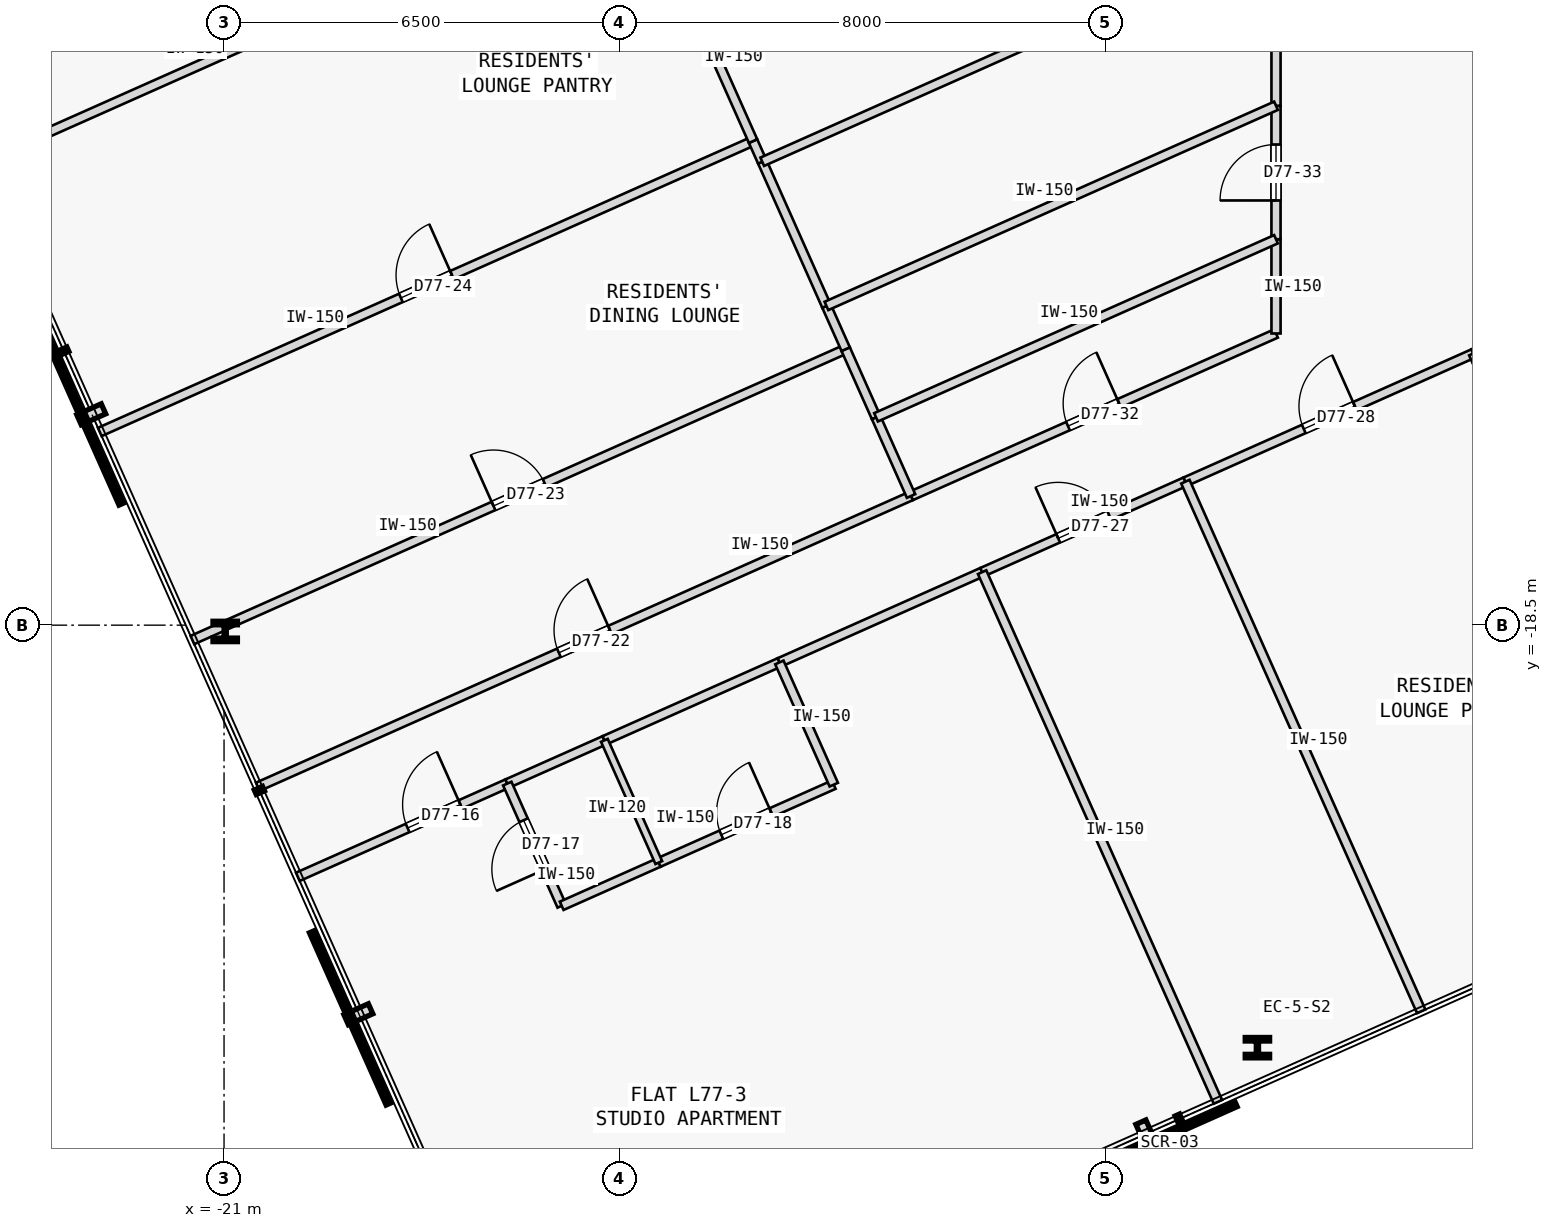
"""IFC4 building model, lengths in metres.
Left out: names, types, materials, properties, quantities, classifications, styles, units other than length and angle.
Written with IfcOpenShell. Run it as: python <this file> out.ifc"""

import sys

from ifc_helpers import new_model, si_unit, direction, frame, frame_2d, origin, origin_2d, place, context, subcontext, project, spatial, rectangle, i_section, extrude, element, fill, save


model = new_model("IFC4")
c1 = context("Model", 3, precision=1e-05, world=origin(), true_north=direction((0.0, 1.0)))
c2 = subcontext(c1, "Body", "Model", "MODEL_VIEW")
j1 = project(units=[si_unit("LENGTHUNIT", "METRE"), si_unit("PLANEANGLEUNIT", "RADIAN")], contexts=[c1])
p1 = place(None, origin())
s1 = spatial("IfcSite", under=j1, at=p1, CompositionType="ELEMENT")
p2 = place(p1, origin())
s2 = spatial("IfcBuilding", under=s1, at=p2, CompositionType="ELEMENT")
p3 = place(p2, frame((0.0, 0.0, 288.6)))
s3 = spatial("IfcBuildingStorey", under=s2, at=p3, CompositionType="ELEMENT", Elevation=288.6)
for number, where, z_axis, x_axis in (
    (1, (-4.006, -25.448, 0.0), (0.0, 0.0, 1.0), (1.0, 0.0, 0.0)),
    (2, (-20.981, -18.603, 0.0), (0.0, 0.0, 1.0), (1.0, 0.0, 0.0)),
):
    element("IfcColumn", number, at=place(p3, frame(where, z_axis=z_axis, x_axis=x_axis)), inside=s3, PredefinedType="COLUMN", context=c2, shape_type="SweptSolid", body=[
        extrude(i_section(OverallWidth=0.401, OverallDepth=0.335, WebThickness=0.036, FlangeThickness=0.058, FilletRadius=0.015, at=origin_2d()), origin(), (0.0, 0.0, 1.0), 3.35),
    ])
p4 = place(p3, frame((-19.786, -22.639, 0.0), z_axis=(0.0, 0.0, 1.0), x_axis=(0.913541633228, 0.406745232743, 0.0)))
e3 = element("IfcWall", 3, at=p4, inside=s3, PredefinedType="PARTITIONING", context=c2, shape_type="SweptSolid", body=[
    extrude(rectangle(XDim=3.77, YDim=0.15, at=frame_2d((1.885, 0.0))), origin(), (0.0, 0.0, 1.0), 3.125),
])
p5 = place(p4, frame((1.976, 0.0, 0.0)))
e4 = element("IfcOpeningElement", 4, at=p5, cuts=e3, PredefinedType="OPENING", context=c2, shape_type="SweptSolid", body=[
    extrude(rectangle(XDim=0.95, YDim=2.15, at=frame_2d((0.475, 1.075))), frame((0.0, 0.085, 0.0), z_axis=(0.0, -1.0, 0.0), x_axis=(1.0, 0.0, 0.0)), (0.0, 0.0, 1.0), 0.17),
])
p6 = place(p3, frame((-11.868, -19.113, 0.0), z_axis=(0.0, 0.0, 1.0), x_axis=(0.913543802, 0.40674036169, 0.0)))
e5 = element("IfcWall", 5, at=p6, inside=s3, PredefinedType="PARTITIONING", context=c2, shape_type="SweptSolid", body=[
    extrude(rectangle(XDim=3.65, YDim=0.15, at=frame_2d((1.825, 0.0))), origin(), (0.0, 0.0, 1.0), 3.125),
])
p7 = place(p3, frame((-16.342, -21.105, 0.0), z_axis=(0.0, 0.0, 1.0), x_axis=(0.9135579554, 0.406708571492, 0.0)))
e6 = element("IfcWall", 6, at=p7, inside=s3, PredefinedType="PARTITIONING", context=c2, shape_type="SweptSolid", body=[
    extrude(rectangle(XDim=1.748, YDim=0.15, at=frame_2d((0.874, 0.0))), origin(), (0.0, 0.0, 1.0), 3.125),
])
p8 = place(p3, frame((-14.745, -20.394, 0.0), z_axis=(0.0, 0.0, 1.0), x_axis=(0.913542880558, 0.406742431252, 0.0)))
e7 = element("IfcWall", 7, at=p8, inside=s3, PredefinedType="PARTITIONING", context=c2, shape_type="SweptSolid", body=[
    extrude(rectangle(XDim=3.15, YDim=0.15, at=frame_2d((1.575, 0.0))), origin(), (0.0, 0.0, 1.0), 3.125),
])
p9 = place(p3, frame((-20.445, -21.159, 0.0), z_axis=(0.0, 0.0, 1.0), x_axis=(0.913547681516, 0.406731648137, 0.0)))
e8 = element("IfcWall", 8, at=p9, inside=s3, PredefinedType="PARTITIONING", context=c2, shape_type="SweptSolid", body=[
    extrude(rectangle(XDim=11.76, YDim=0.15, at=frame_2d((5.88, 0.0))), origin(), (0.0, 0.0, 1.0), 3.125),
])
p10 = place(p9, frame((5.42, 0.0, 0.0)))
e9 = element("IfcOpeningElement", 9, at=p10, cuts=e8, PredefinedType="OPENING", context=c2, shape_type="SweptSolid", body=[
    extrude(rectangle(XDim=0.92, YDim=2.15, at=frame_2d((0.46, 1.075))), frame((0.0, 0.085, 0.0), z_axis=(0.0, -1.0, 0.0), x_axis=(1.0, 0.0, 0.0)), (0.0, 0.0, 1.0), 0.17),
])
p11 = place(p3, frame((-8.533, -17.628, 0.0), z_axis=(0.0, 0.0, 1.0), x_axis=(0.913560976273, 0.406701785873, 0.0)))
e10 = element("IfcWall", 10, at=p11, inside=s3, PredefinedType="PARTITIONING", context=c2, shape_type="SweptSolid", body=[
    extrude(rectangle(XDim=3.659, YDim=0.15, at=frame_2d((1.829, 0.0))), origin(), (0.0, 0.0, 1.0), 3.125),
])
p12 = place(p11, frame((1.369, 0.0, 0.0)))
e11 = element("IfcOpeningElement", 11, at=p12, cuts=e10, PredefinedType="OPENING", context=c2, shape_type="SweptSolid", body=[
    extrude(rectangle(XDim=0.92, YDim=2.15, at=frame_2d((0.46, 1.075))), frame((0.0, 0.085, 0.0), z_axis=(0.0, -1.0, 0.0), x_axis=(1.0, 0.0, 0.0)), (0.0, 0.0, 1.0), 0.17),
])
p13 = place(p3, frame((-5.191, -16.14, 0.0), z_axis=(0.0, 0.0, 1.0), x_axis=(0.913541346619, 0.40674587646, 0.0)))
e12 = element("IfcWall", 12, at=p13, inside=s3, PredefinedType="PARTITIONING", context=c2, shape_type="SweptSolid", body=[
    extrude(rectangle(XDim=5.183, YDim=0.15, at=frame_2d((2.591, 0.0))), origin(), (0.0, 0.0, 1.0), 3.125),
])
p14 = place(p13, frame((2.132, 0.0, 0.0)))
e13 = element("IfcOpeningElement", 13, at=p14, cuts=e12, PredefinedType="OPENING", context=c2, shape_type="SweptSolid", body=[
    extrude(rectangle(XDim=0.92, YDim=2.15, at=frame_2d((0.46, 1.075))), frame((0.0, 0.085, 0.0), z_axis=(0.0, -1.0, 0.0), x_axis=(1.0, 0.0, 0.0)), (0.0, 0.0, 1.0), 0.17),
])
p15 = place(p3, frame((-0.456, -14.032, 0.0), z_axis=(0.0, 0.0, 1.0), x_axis=(0.913541200883, 0.40674620378, 0.0)))
e14 = element("IfcWall", 14, at=p15, inside=s3, PredefinedType="PARTITIONING", context=c2, shape_type="SweptSolid", body=[
    extrude(rectangle(XDim=6.708, YDim=0.15, at=frame_2d((3.354, 0.0))), origin(), (0.0, 0.0, 1.0), 3.125),
])
p16 = place(p15, frame((2.894, 0.0, 0.0)))
e15 = element("IfcOpeningElement", 15, at=p16, cuts=e14, PredefinedType="OPENING", context=c2, shape_type="SweptSolid", body=[
    extrude(rectangle(XDim=0.92, YDim=2.15, at=frame_2d((0.46, 1.075))), frame((0.0, 0.085, 0.0), z_axis=(0.0, -1.0, 0.0), x_axis=(1.0, 0.0, 0.0)), (0.0, 0.0, 1.0), 0.17),
])
p17 = place(p3, frame((-9.702, -16.375, 0.0), z_axis=(0.0, 0.0, 1.0), x_axis=(0.913552389019, 0.406721074594, 0.0)))
e16 = element("IfcWall", 16, at=p17, inside=s3, PredefinedType="PARTITIONING", context=c2, shape_type="SweptSolid", body=[
    extrude(rectangle(XDim=6.57, YDim=0.15, at=frame_2d((3.285, 0.0))), origin(), (0.0, 0.0, 1.0), 3.125),
])
p18 = place(p17, frame((2.825, 0.0, 0.0)))
e17 = element("IfcOpeningElement", 17, at=p18, cuts=e16, PredefinedType="OPENING", context=c2, shape_type="SweptSolid", body=[
    extrude(rectangle(XDim=0.92, YDim=2.15, at=frame_2d((0.46, 1.075))), frame((0.0, 0.085, 0.0), z_axis=(0.0, -1.0, 0.0), x_axis=(1.0, 0.0, 0.0)), (0.0, 0.0, 1.0), 0.17),
])
p19 = place(p3, frame((-3.7, -13.703, 0.0), z_axis=(0.0, 0.0, 1.0), x_axis=(-0.000157529929, 0.999999987592, 0.0)))
e18 = element("IfcWall", 18, at=p19, inside=s3, PredefinedType="PARTITIONING", context=c2, shape_type="SweptSolid", body=[
    extrude(rectangle(XDim=1.55, YDim=0.15, at=frame_2d((0.775, 0.0))), origin(), (0.0, 0.0, 1.0), 3.125),
])
p20 = place(p3, frame((-3.7, -12.154, 0.0), z_axis=(0.0, 0.0, 1.0), x_axis=(0.000111222333, 0.999999993815, 0.0)))
e19 = element("IfcWall", 19, at=p20, inside=s3, PredefinedType="PARTITIONING", context=c2, shape_type="SweptSolid", body=[
    extrude(rectangle(XDim=2.195, YDim=0.15, at=frame_2d((1.098, 0.0))), origin(), (0.0, 0.0, 1.0), 3.125),
])
p21 = place(p20, frame((0.637, 0.0, 0.0)))
e20 = element("IfcOpeningElement", 20, at=p21, cuts=e19, PredefinedType="OPENING", context=c2, shape_type="SweptSolid", body=[
    extrude(rectangle(XDim=0.92, YDim=2.15, at=frame_2d((0.46, 1.075))), frame((0.0, 0.085, 0.0), z_axis=(0.0, -1.0, 0.0), x_axis=(1.0, 0.0, 0.0)), (0.0, 0.0, 1.0), 0.17),
])
p22 = place(p3, frame((-3.7, -9.958, 0.0), z_axis=(0.0, 0.0, 1.0), x_axis=(-0.000171909917, 0.999999985223, 0.0)))
e21 = element("IfcWall", 21, at=p22, inside=s3, PredefinedType="PARTITIONING", context=c2, shape_type="SweptSolid", body=[
    extrude(rectangle(XDim=2.84, YDim=0.15, at=frame_2d((1.42, 0.0))), origin(), (0.0, 0.0, 1.0), 3.125),
])
p23 = place(p22, frame((0.96, 0.0, 0.0)))
e22 = element("IfcOpeningElement", 22, at=p23, cuts=e21, PredefinedType="OPENING", context=c2, shape_type="SweptSolid", body=[
    extrude(rectangle(XDim=0.92, YDim=2.15, at=frame_2d((0.46, 1.075))), frame((0.0, 0.085, 0.0), z_axis=(0.0, -1.0, 0.0), x_axis=(1.0, 0.0, 0.0)), (0.0, 0.0, 1.0), 0.17),
])
p24 = place(p3, frame((-15.448, -23.115, 0.0), z_axis=(0.0, 0.0, 1.0), x_axis=(-0.406725294076, 0.913550510459, 0.0)))
e23 = element("IfcWall", 23, at=p24, inside=s3, PredefinedType="PARTITIONING", context=c2, shape_type="SweptSolid", body=[
    extrude(rectangle(XDim=2.2, YDim=0.15, at=frame_2d((1.1, 0.0))), origin(), (0.0, 0.0, 1.0), 3.125),
])
p25 = place(p24, frame((0.66, 0.0, 0.0)))
e24 = element("IfcOpeningElement", 24, at=p25, cuts=e23, PredefinedType="OPENING", context=c2, shape_type="SweptSolid", body=[
    extrude(rectangle(XDim=0.88, YDim=2.15, at=frame_2d((0.44, 1.075))), frame((0.0, 0.085, 0.0), z_axis=(0.0, -1.0, 0.0), x_axis=(1.0, 0.0, 0.0)), (0.0, 0.0, 1.0), 0.17),
])
p26 = place(p3, frame((-15.448, -23.115, 0.0), z_axis=(0.0, 0.0, 1.0), x_axis=(0.9135579554, 0.406708571492, 0.0)))
e25 = element("IfcWall", 25, at=p26, inside=s3, PredefinedType="PARTITIONING", context=c2, shape_type="SweptSolid", body=[
    extrude(rectangle(XDim=1.748, YDim=0.15, at=frame_2d((0.874, 0.0))), origin(), (0.0, 0.0, 1.0), 3.125),
])
p27 = place(p3, frame((-13.851, -22.404, 0.0), z_axis=(0.0, 0.0, 1.0), x_axis=(0.913542880558, 0.406742431252, 0.0)))
e26 = element("IfcWall", 26, at=p27, inside=s3, PredefinedType="PARTITIONING", context=c2, shape_type="SweptSolid", body=[
    extrude(rectangle(XDim=3.15, YDim=0.15, at=frame_2d((1.575, 0.0))), origin(), (0.0, 0.0, 1.0), 3.125),
])
p28 = place(p27, frame((1.125, 0.0, 0.0)))
e27 = element("IfcOpeningElement", 27, at=p28, cuts=e26, PredefinedType="OPENING", context=c2, shape_type="SweptSolid", body=[
    extrude(rectangle(XDim=0.9, YDim=2.15, at=frame_2d((0.45, 1.075))), frame((0.0, 0.085, 0.0), z_axis=(0.0, -1.0, 0.0), x_axis=(1.0, 0.0, 0.0)), (0.0, 0.0, 1.0), 0.17),
])
p29 = place(p3, frame((-10.973, -21.123, 0.0), z_axis=(0.0, 0.0, 1.0), x_axis=(-0.406725294076, 0.913550510459, 0.0)))
e28 = element("IfcWall", 28, at=p29, inside=s3, PredefinedType="PARTITIONING", context=c2, shape_type="SweptSolid", body=[
    extrude(rectangle(XDim=2.2, YDim=0.15, at=frame_2d((1.1, 0.0))), origin(), (0.0, 0.0, 1.0), 3.125),
])
p30 = place(p3, frame((-4.655, -26.339, 0.0), z_axis=(0.0, 0.0, 1.0), x_axis=(-0.406729927653, 0.913548447512, 0.0)))
e29 = element("IfcWall", 29, at=p30, inside=s3, PredefinedType="PARTITIONING", context=c2, shape_type="SweptSolid", body=[
    extrude(rectangle(XDim=9.535, YDim=0.15, at=frame_2d((4.768, 0.0))), origin(), (0.0, 0.0, 1.0), 3.125),
])
p31 = place(p3, frame((-13.851, -22.404, 0.0), z_axis=(0.0, 0.0, 1.0), x_axis=(-0.406725294076, 0.913550510459, 0.0)))
e30 = element("IfcWall", 30, at=p31, inside=s3, PredefinedType="PARTITIONING", context=c2, shape_type="SweptSolid", body=[
    extrude(rectangle(XDim=2.2, YDim=0.12, at=frame_2d((1.1, 0.0))), origin(), (0.0, 0.0, 1.0), 3.125),
])
p32 = place(p3, frame((-21.52, -18.744, 0.0), z_axis=(0.0, 0.0, 1.0), x_axis=(0.913539967617, 0.406748973651, 0.0)))
e31 = element("IfcWall", 31, at=p32, inside=s3, PredefinedType="PARTITIONING", context=c2, shape_type="SweptSolid", body=[
    extrude(rectangle(XDim=11.76, YDim=0.15, at=frame_2d((5.88, 0.0))), origin(), (0.0, 0.0, 1.0), 3.125),
])
p33 = place(p32, frame((5.42, 0.0, 0.0)))
e32 = element("IfcOpeningElement", 32, at=p33, cuts=e31, PredefinedType="OPENING", context=c2, shape_type="SweptSolid", body=[
    extrude(rectangle(XDim=0.92, YDim=2.15, at=frame_2d((0.46, 1.075))), frame((0.0, 0.085, 0.0), z_axis=(0.0, -1.0, 0.0), x_axis=(1.0, 0.0, 0.0)), (0.0, 0.0, 1.0), 0.17),
])
p34 = place(p3, frame((-9.702, -16.375, 0.0), z_axis=(0.0, 0.0, 1.0), x_axis=(-0.406762319034, 0.913534025537, 0.0)))
e33 = element("IfcWall", 33, at=p34, inside=s3, PredefinedType="PARTITIONING", context=c2, shape_type="SweptSolid", body=[
    extrude(rectangle(XDim=1.416, YDim=0.15, at=frame_2d((0.708, 0.0))), origin(), (0.0, 0.0, 1.0), 3.125),
])
p35 = place(p3, frame((-10.278, -15.082, 0.0), z_axis=(0.0, 0.0, 1.0), x_axis=(-0.406655262741, 0.913581686159, 0.0)))
e34 = element("IfcWall", 34, at=p35, inside=s3, PredefinedType="PARTITIONING", context=c2, shape_type="SweptSolid", body=[
    extrude(rectangle(XDim=1.227, YDim=0.15, at=frame_2d((0.614, 0.0))), origin(), (0.0, 0.0, 1.0), 3.125),
])
p36 = place(p3, frame((-23.043, -15.323, 0.0), z_axis=(0.0, 0.0, 1.0), x_axis=(0.913547681516, 0.406731648137, 0.0)))
e35 = element("IfcWall", 35, at=p36, inside=s3, PredefinedType="PARTITIONING", context=c2, shape_type="SweptSolid", body=[
    extrude(rectangle(XDim=11.76, YDim=0.15, at=frame_2d((5.88, 0.0))), origin(), (0.0, 0.0, 1.0), 3.125),
])
p37 = place(p36, frame((5.42, 0.0, 0.0)))
e36 = element("IfcOpeningElement", 36, at=p37, cuts=e35, PredefinedType="OPENING", context=c2, shape_type="SweptSolid", body=[
    extrude(rectangle(XDim=0.92, YDim=2.15, at=frame_2d((0.46, 1.075))), frame((0.0, 0.085, 0.0), z_axis=(0.0, -1.0, 0.0), x_axis=(1.0, 0.0, 0.0)), (0.0, 0.0, 1.0), 0.17),
])
p38 = place(p3, frame((-10.777, -13.961, 0.0), z_axis=(0.0, 0.0, 1.0), x_axis=(-0.406720744325, 0.913552536057, 0.0)))
e37 = element("IfcWall", 37, at=p38, inside=s3, PredefinedType="PARTITIONING", context=c2, shape_type="SweptSolid", body=[
    extrude(rectangle(XDim=0.778, YDim=0.15, at=frame_2d((0.389, 0.0))), origin(), (0.0, 0.0, 1.0), 3.125),
])
p39 = place(p3, frame((-11.093, -13.25, 0.0), z_axis=(0.0, 0.0, 1.0), x_axis=(-0.406723252866, 0.91355141923, 0.0)))
e38 = element("IfcWall", 38, at=p39, inside=s3, PredefinedType="PARTITIONING", context=c2, shape_type="SweptSolid", body=[
    extrude(rectangle(XDim=2.595, YDim=0.15, at=frame_2d((1.297, 0.0))), origin(), (0.0, 0.0, 1.0), 3.125),
])
p40 = place(p3, frame((-12.149, -10.88, 0.0), z_axis=(0.0, 0.0, 1.0), x_axis=(-0.406868995548, 0.913486519037, 0.0)))
e39 = element("IfcWall", 39, at=p40, inside=s3, PredefinedType="PARTITIONING", context=c2, shape_type="SweptSolid", body=[
    extrude(rectangle(XDim=0.372, YDim=0.15, at=frame_2d((0.186, 0.0))), origin(), (0.0, 0.0, 1.0), 3.125),
])
p41 = place(p3, frame((-25.014, -10.896, 0.0), z_axis=(0.0, 0.0, 1.0), x_axis=(0.913544247064, 0.406739362069, 0.0)))
e40 = element("IfcWall", 40, at=p41, inside=s3, PredefinedType="PARTITIONING", context=c2, shape_type="SweptSolid", body=[
    extrude(rectangle(XDim=11.76, YDim=0.15, at=frame_2d((5.88, 0.0))), origin(), (0.0, 0.0, 1.0), 3.125),
])
p42 = place(p41, frame((5.42, 0.0, 0.0)))
e41 = element("IfcOpeningElement", 41, at=p42, cuts=e40, PredefinedType="OPENING", context=c2, shape_type="SweptSolid", body=[
    extrude(rectangle(XDim=0.92, YDim=2.15, at=frame_2d((0.46, 1.075))), frame((0.0, 0.085, 0.0), z_axis=(0.0, -1.0, 0.0), x_axis=(1.0, 0.0, 0.0)), (0.0, 0.0, 1.0), 0.17),
])
p43 = place(p3, frame((-12.3, -10.54, 0.0), z_axis=(0.0, 0.0, 1.0), x_axis=(-0.406788806475, 0.913522231216, 0.0)))
e42 = element("IfcWall", 42, at=p43, inside=s3, PredefinedType="PARTITIONING", context=c2, shape_type="SweptSolid", body=[
    extrude(rectangle(XDim=2.577, YDim=0.15, at=frame_2d((1.289, 0.0))), origin(), (0.0, 0.0, 1.0), 3.125),
])
p44 = place(p3, frame((-1.312, -24.851, 0.0), z_axis=(0.0, 0.0, 1.0), x_axis=(-0.406760810574, 0.913534697196, 0.0)))
e43 = element("IfcWall", 43, at=p44, inside=s3, PredefinedType="PARTITIONING", context=c2, shape_type="SweptSolid", body=[
    extrude(rectangle(XDim=9.535, YDim=0.15, at=frame_2d((4.768, 0.0))), origin(), (0.0, 0.0, 1.0), 3.125),
])
p45 = place(p3, frame((3.423, -22.743, 0.0), z_axis=(0.0, 0.0, 1.0), x_axis=(-0.406751296215, 0.913538933504, 0.0)))
e44 = element("IfcWall", 44, at=p45, inside=s3, PredefinedType="PARTITIONING", context=c2, shape_type="SweptSolid", body=[
    extrude(rectangle(XDim=9.535, YDim=0.15, at=frame_2d((4.768, 0.0))), origin(), (0.0, 0.0, 1.0), 3.125),
])
p46 = place(p3, frame((-10.278, -15.082, 0.0), z_axis=(0.0, 0.0, 1.0), x_axis=(0.913549882956, 0.406726703513, 0.0)))
e45 = element("IfcWall", 45, at=p46, inside=s3, PredefinedType="PARTITIONING", context=c2, shape_type="SweptSolid", body=[
    extrude(rectangle(XDim=7.2, YDim=0.15, at=frame_2d((3.6, 0.0))), origin(), (0.0, 0.0, 1.0), 3.125),
])
p47 = place(p3, frame((-11.093, -13.25, 0.0), z_axis=(0.0, 0.0, 1.0), x_axis=(0.913543891457, 0.406740160767, 0.0)))
e46 = element("IfcWall", 46, at=p47, inside=s3, PredefinedType="PARTITIONING", context=c2, shape_type="SweptSolid", body=[
    extrude(rectangle(XDim=8.093, YDim=0.15, at=frame_2d((4.046, 0.0))), origin(), (0.0, 0.0, 1.0), 3.125),
])
p48 = place(p3, frame((-12.149, -10.88, 0.0), z_axis=(0.0, 0.0, 1.0), x_axis=(0.913542450291, 0.406743397631, 0.0)))
e47 = element("IfcWall", 47, at=p48, inside=s3, PredefinedType="PARTITIONING", context=c2, shape_type="SweptSolid", body=[
    extrude(rectangle(XDim=9.248, YDim=0.15, at=frame_2d((4.624, 0.0))), origin(), (0.0, 0.0, 1.0), 3.125),
])
p49 = place(p5, origin())
e48 = element("IfcDoor", 48, at=p49, inside=s3, OperationType="SINGLE_SWING_RIGHT", PredefinedType="DOOR", context=c2, shape_type="SweptSolid", body=[
    extrude(rectangle(XDim=0.95, YDim=2.15, at=frame_2d((0.475, 1.075))), frame((0.0, 0.025, 0.0), z_axis=(0.0, -1.0, 0.0), x_axis=(1.0, 0.0, 0.0)), (0.0, 0.0, 1.0), 0.05),
])
fill(e4, e48)
p50 = place(p25, origin())
e49 = element("IfcDoor", 49, at=p50, inside=s3, OperationType="SINGLE_SWING_LEFT", PredefinedType="DOOR", context=c2, shape_type="SweptSolid", body=[
    extrude(rectangle(XDim=0.88, YDim=2.15, at=frame_2d((0.44, 1.075))), frame((0.0, 0.025, 0.0), z_axis=(0.0, -1.0, 0.0), x_axis=(1.0, 0.0, 0.0)), (0.0, 0.0, 1.0), 0.05),
])
fill(e24, e49)
p51 = place(p28, origin())
e50 = element("IfcDoor", 50, at=p51, inside=s3, OperationType="SINGLE_SWING_RIGHT", PredefinedType="DOOR", context=c2, shape_type="SweptSolid", body=[
    extrude(rectangle(XDim=0.9, YDim=2.15, at=frame_2d((0.45, 1.075))), frame((0.0, 0.025, 0.0), z_axis=(0.0, -1.0, 0.0), x_axis=(1.0, 0.0, 0.0)), (0.0, 0.0, 1.0), 0.05),
])
fill(e27, e50)
p52 = place(p10, origin())
e51 = element("IfcDoor", 51, at=p52, inside=s3, OperationType="SINGLE_SWING_RIGHT", PredefinedType="DOOR", context=c2, shape_type="SweptSolid", body=[
    extrude(rectangle(XDim=0.92, YDim=2.15, at=frame_2d((0.46, 1.075))), frame((0.0, 0.025, 0.0), z_axis=(0.0, -1.0, 0.0), x_axis=(1.0, 0.0, 0.0)), (0.0, 0.0, 1.0), 0.05),
])
fill(e9, e51)
p53 = place(p33, origin())
e52 = element("IfcDoor", 52, at=p53, inside=s3, OperationType="SINGLE_SWING_LEFT", PredefinedType="DOOR", context=c2, shape_type="SweptSolid", body=[
    extrude(rectangle(XDim=0.92, YDim=2.15, at=frame_2d((0.46, 1.075))), frame((0.0, 0.025, 0.0), z_axis=(0.0, -1.0, 0.0), x_axis=(1.0, 0.0, 0.0)), (0.0, 0.0, 1.0), 0.05),
])
fill(e32, e52)
p54 = place(p37, origin())
e53 = element("IfcDoor", 53, at=p54, inside=s3, OperationType="SINGLE_SWING_RIGHT", PredefinedType="DOOR", context=c2, shape_type="SweptSolid", body=[
    extrude(rectangle(XDim=0.92, YDim=2.15, at=frame_2d((0.46, 1.075))), frame((0.0, 0.025, 0.0), z_axis=(0.0, -1.0, 0.0), x_axis=(1.0, 0.0, 0.0)), (0.0, 0.0, 1.0), 0.05),
])
fill(e36, e53)
p55 = place(p12, origin())
e54 = element("IfcDoor", 54, at=p55, inside=s3, OperationType="SINGLE_SWING_LEFT", PredefinedType="DOOR", context=c2, shape_type="SweptSolid", body=[
    extrude(rectangle(XDim=0.92, YDim=2.15, at=frame_2d((0.46, 1.075))), frame((0.0, 0.025, 0.0), z_axis=(0.0, -1.0, 0.0), x_axis=(1.0, 0.0, 0.0)), (0.0, 0.0, 1.0), 0.05),
])
fill(e11, e54)
p56 = place(p14, origin())
e55 = element("IfcDoor", 55, at=p56, inside=s3, OperationType="SINGLE_SWING_RIGHT", PredefinedType="DOOR", context=c2, shape_type="SweptSolid", body=[
    extrude(rectangle(XDim=0.92, YDim=2.15, at=frame_2d((0.46, 1.075))), frame((0.0, 0.025, 0.0), z_axis=(0.0, -1.0, 0.0), x_axis=(1.0, 0.0, 0.0)), (0.0, 0.0, 1.0), 0.05),
])
fill(e13, e55)
p57 = place(p18, origin())
e56 = element("IfcDoor", 56, at=p57, inside=s3, OperationType="SINGLE_SWING_RIGHT", PredefinedType="DOOR", context=c2, shape_type="SweptSolid", body=[
    extrude(rectangle(XDim=0.92, YDim=2.15, at=frame_2d((0.46, 1.075))), frame((0.0, 0.025, 0.0), z_axis=(0.0, -1.0, 0.0), x_axis=(1.0, 0.0, 0.0)), (0.0, 0.0, 1.0), 0.05),
])
fill(e17, e56)
p58 = place(p21, origin())
e57 = element("IfcDoor", 57, at=p58, inside=s3, OperationType="SINGLE_SWING_LEFT", PredefinedType="DOOR", context=c2, shape_type="SweptSolid", body=[
    extrude(rectangle(XDim=0.92, YDim=2.15, at=frame_2d((0.46, 1.075))), frame((0.0, 0.025, 0.0), z_axis=(0.0, -1.0, 0.0), x_axis=(1.0, 0.0, 0.0)), (0.0, 0.0, 1.0), 0.05),
])
fill(e20, e57)
save(model, sys.argv[1])
